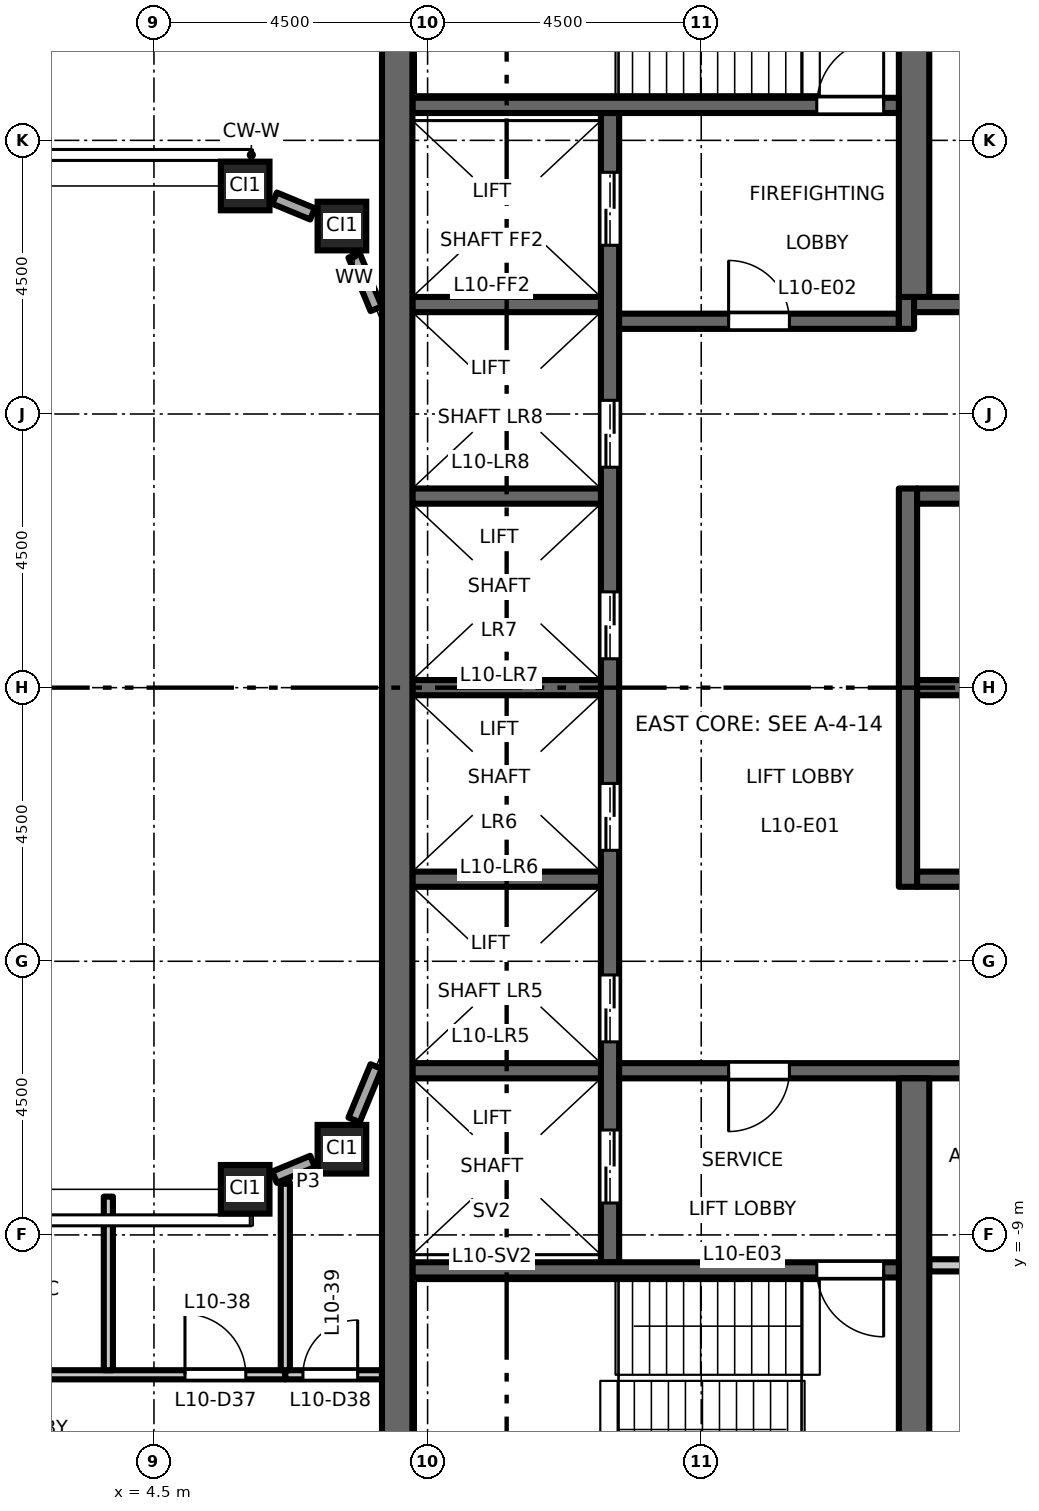
"""IFC4 building model, lengths in metres.
Left out: names, types, materials, properties, quantities, classifications, styles, units other than length and angle.
Written with IfcOpenShell. Run it as: python <this file> out.ifc"""

import sys

from ifc_helpers import new_model, si_unit, direction, frame, frame_2d, origin, origin_2d, place, context, subcontext, project, spatial, rectangle, hollow_rectangle, extrude, element, fill, save


model = new_model("IFC4")
c1 = context("Model", 3, precision=1e-05, world=origin(), true_north=direction((0.0, 1.0)))
c2 = subcontext(c1, "Body", "Model", "MODEL_VIEW")
j1 = project(units=[si_unit("LENGTHUNIT", "METRE"), si_unit("PLANEANGLEUNIT", "RADIAN")], contexts=[c1])
p1 = place(None, origin())
s1 = spatial("IfcSite", under=j1, at=p1, CompositionType="ELEMENT")
p2 = place(p1, origin())
s2 = spatial("IfcBuilding", under=s1, at=p2, CompositionType="ELEMENT")
p3 = place(p2, frame((0.0, 0.0, 49.2)))
s3 = spatial("IfcBuildingStorey", under=s2, at=p3, CompositionType="ELEMENT", Elevation=49.2)
for number, where, z_axis, x_axis in (
    (1, (6.0, -8.25, 0.0), (0.0, 0.0, 1.0), (1.0, 0.0, 0.0)),
    (2, (7.591, -7.591, 0.0), (0.0, 0.0, 1.0), (1.0, 0.0, 0.0)),
    (3, (6.0, 8.25, 0.0), (0.0, 0.0, 1.0), (1.0, 0.0, 0.0)),
    (4, (7.591, 7.591, 0.0), (0.0, 0.0, 1.0), (1.0, 0.0, 0.0)),
):
    element("IfcColumn", number, at=place(p3, frame(where, z_axis=z_axis, x_axis=x_axis)), inside=s3, PredefinedType="COLUMN", context=c2, shape_type="SweptSolid", body=[
        extrude(hollow_rectangle(XDim=0.8, YDim=0.8, WallThickness=0.05, at=origin_2d()), origin(), (0.0, 0.0, 1.0), 4.5),
    ])
p4 = place(p3, frame((12.0, -9.45, 0.0), z_axis=(0.0, 0.0, 1.0), x_axis=(0.0, 1.0, 0.0)))
e5 = element("IfcWall", 5, at=p4, inside=s3, PredefinedType="SHEAR", context=c2, shape_type="SweptSolid", body=[
    extrude(rectangle(XDim=18.9, YDim=0.3, at=frame_2d((9.45, 0.0))), origin(), (0.0, 0.0, 1.0), 4.35),
])
p5 = place(p4, frame((3.625, 0.0, 0.0)))
e6 = element("IfcOpeningElement", 6, at=p5, cuts=e5, PredefinedType="OPENING", context=c2, shape_type="SweptSolid", body=[
    extrude(rectangle(XDim=1.1, YDim=2.1, at=frame_2d((0.55, 1.05))), frame((0.0, 0.16, 0.0), z_axis=(0.0, -1.0, 0.0), x_axis=(1.0, 0.0, 0.0)), (0.0, 0.0, 1.0), 0.32),
])
p6 = place(p4, frame((6.775, 0.0, 0.0)))
e7 = element("IfcOpeningElement", 7, at=p6, cuts=e5, PredefinedType="OPENING", context=c2, shape_type="SweptSolid", body=[
    extrude(rectangle(XDim=1.1, YDim=2.1, at=frame_2d((0.55, 1.05))), frame((0.0, 0.16, 0.0), z_axis=(0.0, -1.0, 0.0), x_axis=(1.0, 0.0, 0.0)), (0.0, 0.0, 1.0), 0.32),
])
p7 = place(p4, frame((9.925, 0.0, 0.0)))
e8 = element("IfcOpeningElement", 8, at=p7, cuts=e5, PredefinedType="OPENING", context=c2, shape_type="SweptSolid", body=[
    extrude(rectangle(XDim=1.1, YDim=2.1, at=frame_2d((0.55, 1.05))), frame((0.0, 0.16, 0.0), z_axis=(0.0, -1.0, 0.0), x_axis=(1.0, 0.0, 0.0)), (0.0, 0.0, 1.0), 0.32),
])
p8 = place(p4, frame((13.075, 0.0, 0.0)))
e9 = element("IfcOpeningElement", 9, at=p8, cuts=e5, PredefinedType="OPENING", context=c2, shape_type="SweptSolid", body=[
    extrude(rectangle(XDim=1.1, YDim=2.1, at=frame_2d((0.55, 1.05))), frame((0.0, 0.16, 0.0), z_axis=(0.0, -1.0, 0.0), x_axis=(1.0, 0.0, 0.0)), (0.0, 0.0, 1.0), 0.32),
])
p9 = place(p4, frame((16.725, 0.0, 0.0)))
e10 = element("IfcOpeningElement", 10, at=p9, cuts=e5, PredefinedType="OPENING", context=c2, shape_type="SweptSolid", body=[
    extrude(rectangle(XDim=1.2, YDim=2.1, at=frame_2d((0.6, 1.05))), frame((0.0, 0.16, 0.0), z_axis=(0.0, -1.0, 0.0), x_axis=(1.0, 0.0, 0.0)), (0.0, 0.0, 1.0), 0.32),
])
p10 = place(p4, frame((0.975, 0.0, 0.0)))
e11 = element("IfcOpeningElement", 11, at=p10, cuts=e5, PredefinedType="OPENING", context=c2, shape_type="SweptSolid", body=[
    extrude(rectangle(XDim=1.2, YDim=2.1, at=frame_2d((0.6, 1.05))), frame((0.0, 0.16, 0.0), z_axis=(0.0, -1.0, 0.0), x_axis=(1.0, 0.0, 0.0)), (0.0, 0.0, 1.0), 0.32),
])
p11 = place(p3, frame((12.15, 6.025, 0.0), z_axis=(0.0, 0.0, 1.0), x_axis=(1.0, 0.0, 0.0)))
e12 = element("IfcWall", 12, at=p11, inside=s3, PredefinedType="SHEAR", context=c2, shape_type="SweptSolid", body=[
    extrude(rectangle(XDim=4.6, YDim=0.25, at=frame_2d((2.3, 0.0))), origin(), (0.0, 0.0, 1.0), 4.35),
])
p12 = place(p11, frame((1.8, 0.0, 0.0)))
e13 = element("IfcOpeningElement", 13, at=p12, cuts=e12, PredefinedType="OPENING", context=c2, shape_type="SweptSolid", body=[
    extrude(rectangle(XDim=1.0, YDim=2.1, at=frame_2d((0.5, 1.05))), frame((0.0, 0.135, 0.0), z_axis=(0.0, -1.0, 0.0), x_axis=(1.0, 0.0, 0.0)), (0.0, 0.0, 1.0), 0.27),
])
p13 = place(p3, frame((16.875, 5.9, 0.0), z_axis=(0.0, 0.0, 1.0), x_axis=(0.0, 1.0, 0.0)))
e14 = element("IfcWall", 14, at=p13, inside=s3, PredefinedType="SHEAR", context=c2, shape_type="SweptSolid", body=[
    extrude(rectangle(XDim=0.525, YDim=0.25, at=frame_2d((0.263, 0.0))), origin(), (0.0, 0.0, 1.0), 4.35),
])
p14 = place(p3, frame((17.0, 6.3, 0.0), z_axis=(0.0, 0.0, 1.0), x_axis=(1.0, 0.0, 0.0)))
e15 = element("IfcWall", 15, at=p14, inside=s3, PredefinedType="SHEAR", context=c2, shape_type="SweptSolid", body=[
    extrude(rectangle(XDim=4.25, YDim=0.25, at=frame_2d((2.125, 0.0))), origin(), (0.0, 0.0, 1.0), 4.35),
])
p15 = place(p14, frame((2.8, 0.0, 0.0)))
e16 = element("IfcOpeningElement", 16, at=p15, cuts=e15, PredefinedType="OPENING", context=c2, shape_type="SweptSolid", body=[
    extrude(rectangle(XDim=0.9, YDim=2.1, at=frame_2d((0.45, 1.05))), frame((0.0, 0.135, 0.0), z_axis=(0.0, -1.0, 0.0), x_axis=(1.0, 0.0, 0.0)), (0.0, 0.0, 1.0), 0.27),
])
p16 = place(p3, frame((12.15, -6.3, 0.0), z_axis=(0.0, 0.0, 1.0), x_axis=(1.0, 0.0, 0.0)))
e17 = element("IfcWall", 17, at=p16, inside=s3, PredefinedType="SHEAR", context=c2, shape_type="SweptSolid", body=[
    extrude(rectangle(XDim=9.1, YDim=0.25, at=frame_2d((4.55, 0.0))), origin(), (0.0, 0.0, 1.0), 4.35),
])
p17 = place(p16, frame((1.8, 0.0, 0.0)))
e18 = element("IfcOpeningElement", 18, at=p17, cuts=e17, PredefinedType="OPENING", context=c2, shape_type="SweptSolid", body=[
    extrude(rectangle(XDim=1.0, YDim=2.1, at=frame_2d((0.5, 1.05))), frame((0.0, 0.135, 0.0), z_axis=(0.0, -1.0, 0.0), x_axis=(1.0, 0.0, 0.0)), (0.0, 0.0, 1.0), 0.27),
])
p18 = place(p16, frame((6.65, 0.0, 0.0)))
e19 = element("IfcOpeningElement", 19, at=p18, cuts=e17, PredefinedType="OPENING", context=c2, shape_type="SweptSolid", body=[
    extrude(rectangle(XDim=0.9, YDim=2.1, at=frame_2d((0.45, 1.05))), frame((0.0, 0.135, 0.0), z_axis=(0.0, -1.0, 0.0), x_axis=(1.0, 0.0, 0.0)), (0.0, 0.0, 1.0), 0.27),
])
p19 = place(p3, frame((17.25, -9.5, 0.0), z_axis=(0.0, 0.0, 1.0), x_axis=(1.0, 0.0, 0.0)))
e20 = element("IfcWall", 20, at=p19, inside=s3, PredefinedType="PARTITIONING", context=c2, shape_type="SweptSolid", body=[
    extrude(rectangle(XDim=4.0, YDim=0.2, at=frame_2d((2.0, 0.0))), origin(), (0.0, 0.0, 1.0), 4.35),
])
p20 = place(p3, frame((16.9, -3.275, 0.0), z_axis=(0.0, 0.0, 1.0), x_axis=(0.0, 1.0, 0.0)))
e21 = element("IfcWall", 21, at=p20, inside=s3, PredefinedType="SHEAR", context=c2, shape_type="SweptSolid", body=[
    extrude(rectangle(XDim=6.55, YDim=0.3, at=frame_2d((3.275, 0.0))), origin(), (0.0, 0.0, 1.0), 4.35),
])
for number, where, z_axis, x_axis in (
    (22, (17.05, 0.0, 0.0), (0.0, 0.0, 1.0), (1.0, 0.0, 0.0)),
    (23, (17.05, 3.15, 0.0), (0.0, 0.0, 1.0), (1.0, 0.0, 0.0)),
    (24, (17.05, -3.15, 0.0), (0.0, 0.0, 1.0), (1.0, 0.0, 0.0)),
):
    element("IfcWall", number, at=place(p3, frame(where, z_axis=z_axis, x_axis=x_axis)), inside=s3, PredefinedType="SHEAR", context=c2, shape_type="SweptSolid", body=[
        extrude(rectangle(XDim=4.2, YDim=0.25, at=frame_2d((2.1, 0.0))), origin(), (0.0, 0.0, 1.0), 4.35),
    ])
for number, where, z_axis, x_axis in (
    (25, (17.0, 6.425, 0.0), (0.0, 0.0, 1.0), (0.0, 1.0, 0.0)),
    (26, (17.0, -13.0, 0.0), (0.0, 0.0, 1.0), (0.0, 1.0, 0.0)),
):
    element("IfcWall", number, at=place(p3, frame(where, z_axis=z_axis, x_axis=x_axis)), inside=s3, PredefinedType="SHEAR", context=c2, shape_type="SweptSolid", body=[
        extrude(rectangle(XDim=6.575, YDim=0.5, at=frame_2d((3.288, 0.0))), origin(), (0.0, 0.0, 1.0), 4.35),
    ])
for number, where, z_axis, x_axis in (
    (27, (8.75, 0.0, 0.0), (0.0, 0.0, 1.0), (1.0, 0.0, 0.0)),
    (28, (8.75, 3.15, 0.0), (0.0, 0.0, 1.0), (1.0, 0.0, 0.0)),
    (29, (8.75, 6.3, 0.0), (0.0, 0.0, 1.0), (1.0, 0.0, 0.0)),
    (30, (8.75, -3.15, 0.0), (0.0, 0.0, 1.0), (1.0, 0.0, 0.0)),
    (31, (8.75, -6.3, 0.0), (0.0, 0.0, 1.0), (1.0, 0.0, 0.0)),
):
    element("IfcWall", number, at=place(p3, frame(where, z_axis=z_axis, x_axis=x_axis)), inside=s3, PredefinedType="SHEAR", context=c2, shape_type="SweptSolid", body=[
        extrude(rectangle(XDim=3.1, YDim=0.25, at=frame_2d((1.55, 0.0))), origin(), (0.0, 0.0, 1.0), 4.35),
    ])
p21 = place(p3, frame((8.75, 9.575, 0.0), z_axis=(0.0, 0.0, 1.0), x_axis=(1.0, 0.0, 0.0)))
e32 = element("IfcWall", 32, at=p21, inside=s3, PredefinedType="SHEAR", context=c2, shape_type="SweptSolid", body=[
    extrude(rectangle(XDim=8.0, YDim=0.25, at=frame_2d((4.0, 0.0))), origin(), (0.0, 0.0, 1.0), 4.35),
])
p22 = place(p21, frame((6.65, 0.0, 0.0)))
e33 = element("IfcOpeningElement", 33, at=p22, cuts=e32, PredefinedType="OPENING", context=c2, shape_type="SweptSolid", body=[
    extrude(rectangle(XDim=1.1, YDim=2.1, at=frame_2d((0.55, 1.05))), frame((0.0, 0.135, 0.0), z_axis=(0.0, -1.0, 0.0), x_axis=(1.0, 0.0, 0.0)), (0.0, 0.0, 1.0), 0.27),
])
p23 = place(p3, frame((8.75, -9.575, 0.0), z_axis=(0.0, 0.0, 1.0), x_axis=(1.0, 0.0, 0.0)))
e34 = element("IfcWall", 34, at=p23, inside=s3, PredefinedType="SHEAR", context=c2, shape_type="SweptSolid", body=[
    extrude(rectangle(XDim=8.0, YDim=0.25, at=frame_2d((4.0, 0.0))), origin(), (0.0, 0.0, 1.0), 4.35),
])
p24 = place(p23, frame((6.65, 0.0, 0.0)))
e35 = element("IfcOpeningElement", 35, at=p24, cuts=e34, PredefinedType="OPENING", context=c2, shape_type="SweptSolid", body=[
    extrude(rectangle(XDim=1.1, YDim=2.1, at=frame_2d((0.55, 1.05))), frame((0.0, 0.135, 0.0), z_axis=(0.0, -1.0, 0.0), x_axis=(1.0, 0.0, 0.0)), (0.0, 0.0, 1.0), 0.27),
])
p25 = place(p3, frame((8.5, -13.0, 0.0), z_axis=(0.0, 0.0, 1.0), x_axis=(0.0, 1.0, 0.0)))
e36 = element("IfcWall", 36, at=p25, inside=s3, PredefinedType="SHEAR", context=c2, shape_type="SweptSolid", body=[
    extrude(rectangle(XDim=26.0, YDim=0.5, at=frame_2d((13.0, 0.0))), origin(), (0.0, 0.0, 1.0), 4.35),
])
p26 = place(p3, frame((6.483, -8.05, 0.0), z_axis=(0.0, 0.0, 1.0), x_axis=(0.923854141361, 0.382744726273, 0.0)))
e37 = element("IfcWall", 37, at=p26, inside=s3, PredefinedType="STANDARD", context=c2, shape_type="SweptSolid", body=[
    extrude(rectangle(XDim=0.677, YDim=0.2, at=frame_2d((0.338, 0.0))), origin(), (0.0, 0.0, 1.0), 3.73),
])
for number, where, z_axis, x_axis in (
    (38, (7.791, -7.108, 0.0), (0.0, 0.0, 1.0), (0.383, 0.924, 0.0)),
    (39, (8.154, 6.231, 0.0), (0.0, 0.0, 1.0), (-0.383, 0.924, 0.0)),
):
    element("IfcWall", number, at=place(p3, frame(where, z_axis=z_axis, x_axis=x_axis)), inside=s3, PredefinedType="STANDARD", context=c2, shape_type="SweptSolid", body=[
        extrude(rectangle(XDim=0.949, YDim=0.2, at=frame_2d((0.475, 0.0))), origin(), (0.0, 0.0, 1.0), 3.73),
    ])
p27 = place(p3, frame((7.108, 7.791, 0.0), z_axis=(0.0, 0.0, 1.0), x_axis=(-0.923854141361, 0.382744726273, 0.0)))
e40 = element("IfcWall", 40, at=p27, inside=s3, PredefinedType="STANDARD", context=c2, shape_type="SweptSolid", body=[
    extrude(rectangle(XDim=0.677, YDim=0.2, at=frame_2d((0.338, 0.0))), origin(), (0.0, 0.0, 1.0), 3.73),
])
p28 = place(p3, frame((-8.25, -11.3, 0.0), z_axis=(0.0, 0.0, 1.0), x_axis=(1.0, 0.0, 0.0)))
e41 = element("IfcWall", 41, at=p28, inside=s3, PredefinedType="PARTITIONING", context=c2, shape_type="SweptSolid", body=[
    extrude(rectangle(XDim=14.91, YDim=0.15, at=frame_2d((7.455, 0.0))), origin(), (0.0, 0.0, 1.0), 4.35),
])
p29 = place(p28, frame((4.35, 0.0, 0.0)))
e42 = element("IfcOpeningElement", 42, at=p29, cuts=e41, PredefinedType="OPENING", context=c2, shape_type="SweptSolid", body=[
    extrude(rectangle(XDim=1.0, YDim=2.1, at=frame_2d((0.5, 1.05))), frame((0.0, 0.085, 0.0), z_axis=(0.0, -1.0, 0.0), x_axis=(1.0, 0.0, 0.0)), (0.0, 0.0, 1.0), 0.17),
])
p30 = place(p28, frame((6.6, 0.0, 0.0)))
e43 = element("IfcOpeningElement", 43, at=p30, cuts=e41, PredefinedType="OPENING", context=c2, shape_type="SweptSolid", body=[
    extrude(rectangle(XDim=1.0, YDim=2.1, at=frame_2d((0.5, 1.05))), frame((0.0, 0.085, 0.0), z_axis=(0.0, -1.0, 0.0), x_axis=(1.0, 0.0, 0.0)), (0.0, 0.0, 1.0), 0.17),
])
p31 = place(p28, frame((13.26, 0.0, 0.0)))
e44 = element("IfcOpeningElement", 44, at=p31, cuts=e41, PredefinedType="OPENING", context=c2, shape_type="SweptSolid", body=[
    extrude(rectangle(XDim=1.0, YDim=2.1, at=frame_2d((0.5, 1.05))), frame((0.0, 0.085, 0.0), z_axis=(0.0, -1.0, 0.0), x_axis=(1.0, 0.0, 0.0)), (0.0, 0.0, 1.0), 0.17),
])
p32 = place(p3, frame((6.66, -11.3, 0.0), z_axis=(0.0, 0.0, 1.0), x_axis=(1.0, 0.0, 0.0)))
e45 = element("IfcWall", 45, at=p32, inside=s3, PredefinedType="PARTITIONING", context=c2, shape_type="SweptSolid", body=[
    extrude(rectangle(XDim=1.59, YDim=0.15, at=frame_2d((0.795, 0.0))), origin(), (0.0, 0.0, 1.0), 4.35),
])
p33 = place(p32, frame((0.29, 0.0, 0.0)))
e46 = element("IfcOpeningElement", 46, at=p33, cuts=e45, PredefinedType="OPENING", context=c2, shape_type="SweptSolid", body=[
    extrude(rectangle(XDim=0.9, YDim=2.1, at=frame_2d((0.45, 1.05))), frame((0.0, 0.085, 0.0), z_axis=(0.0, -1.0, 0.0), x_axis=(1.0, 0.0, 0.0)), (0.0, 0.0, 1.0), 0.17),
])
p34 = place(p3, frame((3.75, -11.225, 0.0), z_axis=(0.0, 0.0, 1.0), x_axis=(0.0, 1.0, 0.0)))
e47 = element("IfcWall", 47, at=p34, inside=s3, PredefinedType="PARTITIONING", context=c2, shape_type="SweptSolid", body=[
    extrude(rectangle(XDim=2.855, YDim=0.15, at=frame_2d((1.427, 0.0))), origin(), (0.0, 0.0, 1.0), 4.35),
])
p35 = place(p3, frame((6.66, -11.225, 0.0), z_axis=(0.0, 0.0, 1.0), x_axis=(0.0, 1.0, 0.0)))
e48 = element("IfcWall", 48, at=p35, inside=s3, PredefinedType="PARTITIONING", context=c2, shape_type="SweptSolid", body=[
    extrude(rectangle(XDim=3.089, YDim=0.15, at=frame_2d((1.544, 0.0))), origin(), (0.0, 0.0, 1.0), 4.35),
])
p36 = place(p12, origin())
e49 = element("IfcDoor", 49, at=p36, inside=s3, OperationType="SINGLE_SWING_RIGHT", PredefinedType="DOOR", context=c2, shape_type="SweptSolid", body=[
    extrude(rectangle(XDim=1.0, YDim=2.1, at=frame_2d((0.5, 1.05))), frame((0.0, 0.025, 0.0), z_axis=(0.0, -1.0, 0.0), x_axis=(1.0, 0.0, 0.0)), (0.0, 0.0, 1.0), 0.05),
])
fill(e13, e49)
p37 = place(p17, origin())
e50 = element("IfcDoor", 50, at=p37, inside=s3, OperationType="SINGLE_SWING_LEFT", PredefinedType="DOOR", context=c2, shape_type="SweptSolid", body=[
    extrude(rectangle(XDim=1.0, YDim=2.1, at=frame_2d((0.5, 1.05))), frame((0.0, 0.025, 0.0), z_axis=(0.0, -1.0, 0.0), x_axis=(1.0, 0.0, 0.0)), (0.0, 0.0, 1.0), 0.05),
])
fill(e18, e50)
p38 = place(p22, origin())
e51 = element("IfcDoor", 51, at=p38, inside=s3, OperationType="SINGLE_SWING_LEFT", PredefinedType="DOOR", context=c2, shape_type="SweptSolid", body=[
    extrude(rectangle(XDim=1.1, YDim=2.1, at=frame_2d((0.55, 1.05))), frame((0.0, 0.025, 0.0), z_axis=(0.0, -1.0, 0.0), x_axis=(1.0, 0.0, 0.0)), (0.0, 0.0, 1.0), 0.05),
])
fill(e33, e51)
p39 = place(p24, origin())
e52 = element("IfcDoor", 52, at=p39, inside=s3, OperationType="SINGLE_SWING_RIGHT", PredefinedType="DOOR", context=c2, shape_type="SweptSolid", body=[
    extrude(rectangle(XDim=1.1, YDim=2.1, at=frame_2d((0.55, 1.05))), frame((0.0, 0.025, 0.0), z_axis=(0.0, -1.0, 0.0), x_axis=(1.0, 0.0, 0.0)), (0.0, 0.0, 1.0), 0.05),
])
fill(e35, e52)
p40 = place(p5, origin())
e53 = element("IfcDoor", 53, at=p40, inside=s3, OperationType="DOUBLE_DOOR_SLIDING", PredefinedType="DOOR", context=c2, shape_type="SweptSolid", body=[
    extrude(rectangle(XDim=1.1, YDim=2.1, at=frame_2d((0.55, 1.05))), frame((0.0, 0.025, 0.0), z_axis=(0.0, -1.0, 0.0), x_axis=(1.0, 0.0, 0.0)), (0.0, 0.0, 1.0), 0.05),
])
fill(e6, e53)
p41 = place(p6, origin())
e54 = element("IfcDoor", 54, at=p41, inside=s3, OperationType="DOUBLE_DOOR_SLIDING", PredefinedType="DOOR", context=c2, shape_type="SweptSolid", body=[
    extrude(rectangle(XDim=1.1, YDim=2.1, at=frame_2d((0.55, 1.05))), frame((0.0, 0.025, 0.0), z_axis=(0.0, -1.0, 0.0), x_axis=(1.0, 0.0, 0.0)), (0.0, 0.0, 1.0), 0.05),
])
fill(e7, e54)
p42 = place(p7, origin())
e55 = element("IfcDoor", 55, at=p42, inside=s3, OperationType="DOUBLE_DOOR_SLIDING", PredefinedType="DOOR", context=c2, shape_type="SweptSolid", body=[
    extrude(rectangle(XDim=1.1, YDim=2.1, at=frame_2d((0.55, 1.05))), frame((0.0, 0.025, 0.0), z_axis=(0.0, -1.0, 0.0), x_axis=(1.0, 0.0, 0.0)), (0.0, 0.0, 1.0), 0.05),
])
fill(e8, e55)
p43 = place(p8, origin())
e56 = element("IfcDoor", 56, at=p43, inside=s3, OperationType="DOUBLE_DOOR_SLIDING", PredefinedType="DOOR", context=c2, shape_type="SweptSolid", body=[
    extrude(rectangle(XDim=1.1, YDim=2.1, at=frame_2d((0.55, 1.05))), frame((0.0, 0.025, 0.0), z_axis=(0.0, -1.0, 0.0), x_axis=(1.0, 0.0, 0.0)), (0.0, 0.0, 1.0), 0.05),
])
fill(e9, e56)
p44 = place(p9, origin())
e57 = element("IfcDoor", 57, at=p44, inside=s3, OperationType="DOUBLE_DOOR_SLIDING", PredefinedType="DOOR", context=c2, shape_type="SweptSolid", body=[
    extrude(rectangle(XDim=1.2, YDim=2.1, at=frame_2d((0.6, 1.05))), frame((0.0, 0.025, 0.0), z_axis=(0.0, -1.0, 0.0), x_axis=(1.0, 0.0, 0.0)), (0.0, 0.0, 1.0), 0.05),
])
fill(e10, e57)
p45 = place(p10, origin())
e58 = element("IfcDoor", 58, at=p45, inside=s3, OperationType="DOUBLE_DOOR_SLIDING", PredefinedType="DOOR", context=c2, shape_type="SweptSolid", body=[
    extrude(rectangle(XDim=1.2, YDim=2.1, at=frame_2d((0.6, 1.05))), frame((0.0, 0.025, 0.0), z_axis=(0.0, -1.0, 0.0), x_axis=(1.0, 0.0, 0.0)), (0.0, 0.0, 1.0), 0.05),
])
fill(e11, e58)
p46 = place(p31, origin())
e59 = element("IfcDoor", 59, at=p46, inside=s3, OperationType="SINGLE_SWING_LEFT", PredefinedType="DOOR", context=c2, shape_type="SweptSolid", body=[
    extrude(rectangle(XDim=1.0, YDim=2.1, at=frame_2d((0.5, 1.05))), frame((0.0, 0.025, 0.0), z_axis=(0.0, -1.0, 0.0), x_axis=(1.0, 0.0, 0.0)), (0.0, 0.0, 1.0), 0.05),
])
fill(e44, e59)
p47 = place(p33, origin())
e60 = element("IfcDoor", 60, at=p47, inside=s3, OperationType="SINGLE_SWING_RIGHT", PredefinedType="DOOR", context=c2, shape_type="SweptSolid", body=[
    extrude(rectangle(XDim=0.9, YDim=2.1, at=frame_2d((0.45, 1.05))), frame((0.0, 0.025, 0.0), z_axis=(0.0, -1.0, 0.0), x_axis=(1.0, 0.0, 0.0)), (0.0, 0.0, 1.0), 0.05),
])
fill(e46, e60)
save(model, sys.argv[1])
